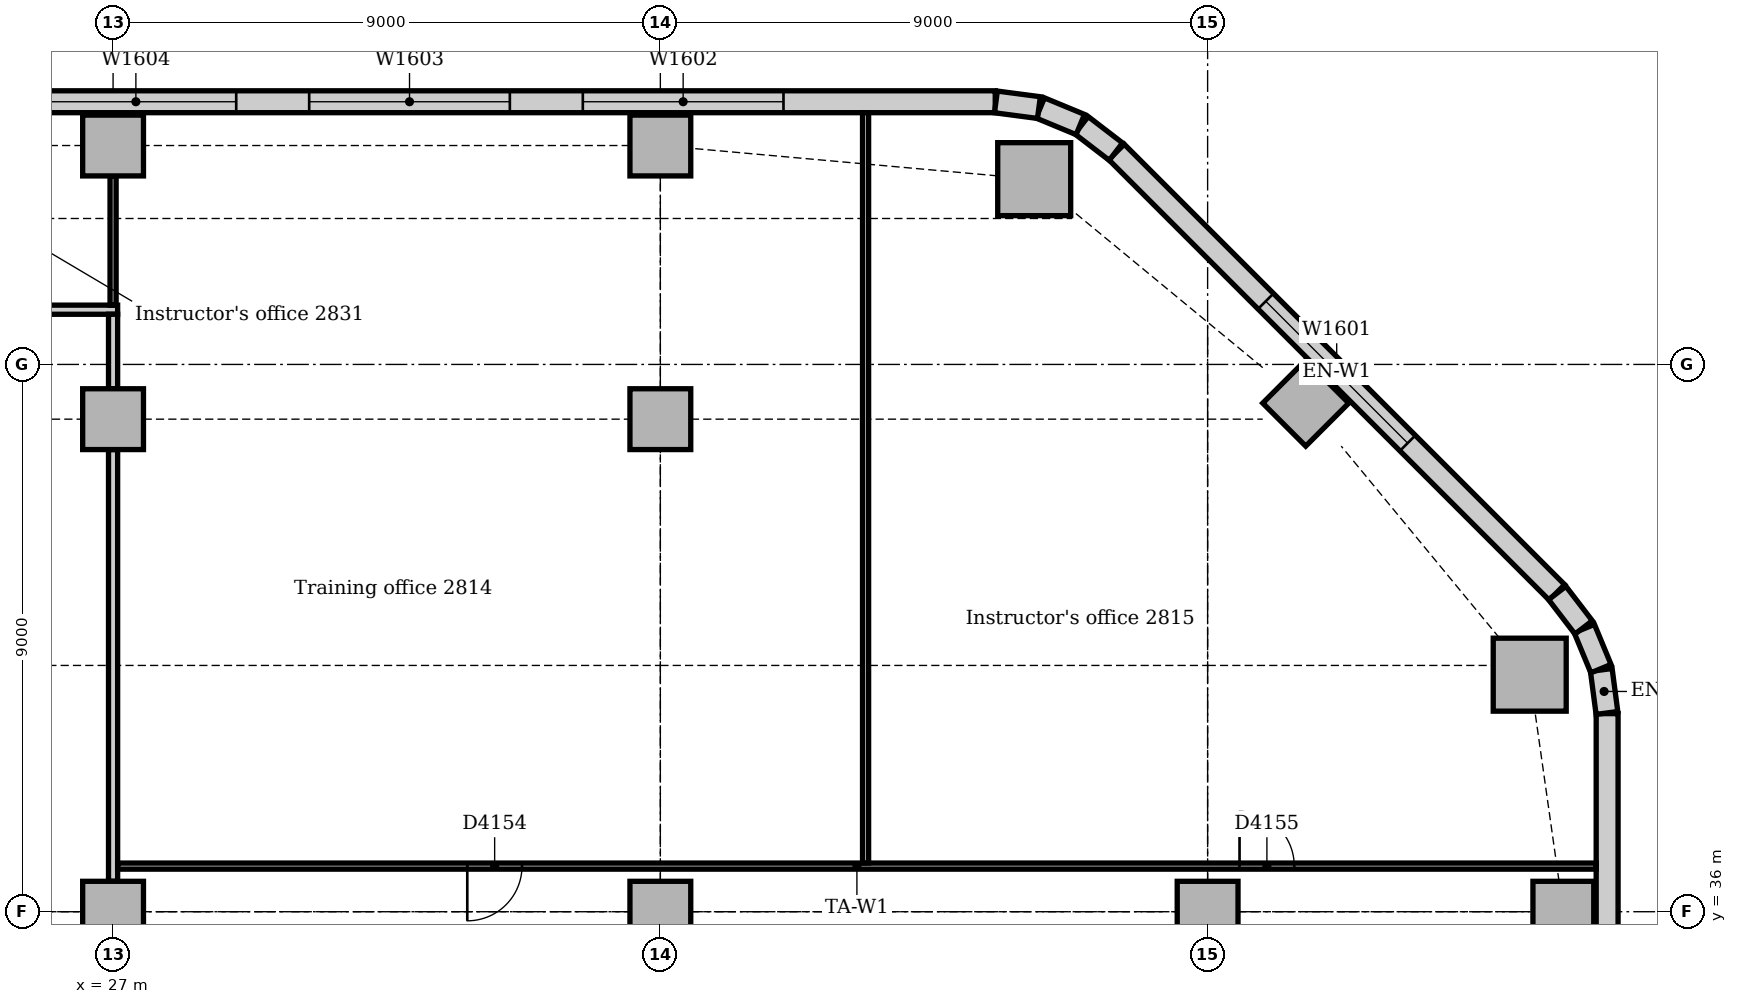
"""IFC4 building model, lengths in metres.
Left out: names, types, materials, properties, quantities, classifications, styles, units other than length and angle.
Written with IfcOpenShell. Run it as: python <this file> out.ifc"""

import sys

from ifc_helpers import new_model, si_unit, direction, frame, frame_2d, origin, origin_2d, place, context, subcontext, project, spatial, rectangle, extrude, element, fill, save


model = new_model("IFC4")
c1 = context("Model", 3, precision=1e-05, world=origin(), true_north=direction((0.0, 1.0)))
c2 = subcontext(c1, "Body", "Model", "MODEL_VIEW")
j1 = project(units=[si_unit("LENGTHUNIT", "METRE"), si_unit("PLANEANGLEUNIT", "RADIAN")], contexts=[c1])
p1 = place(None, origin())
s1 = spatial("IfcSite", under=j1, at=p1, CompositionType="ELEMENT")
p2 = place(p1, origin())
s2 = spatial("IfcBuilding", under=s1, at=p2, CompositionType="ELEMENT")
p3 = place(p2, frame((0.0, 0.0, 120.0)))
s3 = spatial("IfcBuildingStorey", under=s2, at=p3, CompositionType="ELEMENT", Elevation=120.0)
for number, where, z_axis, x_axis in (
    (1, (50.297, 39.898, 0.0), (0.0, 0.0, 1.0), (1.0, 0.0, 0.0)),
    (2, (42.148, 48.047, 0.0), (0.0, 0.0, 1.0), (1.0, 0.0, 0.0)),
):
    element("IfcColumn", number, at=place(p3, frame(where, z_axis=z_axis, x_axis=x_axis)), inside=s3, PredefinedType="COLUMN", context=c2, shape_type="SweptSolid", body=[
        extrude(rectangle(XDim=1.2, YDim=1.2, at=origin_2d()), origin(), (0.0, 0.0, 1.0), 3.85),
    ])
for number, where, z_axis, x_axis in (
    (3, (50.85, 36.0, 0.0), (0.0, 0.0, 1.0), (1.0, 0.0, 0.0)),
    (4, (46.614, 44.364, 0.0), (0.0, 0.0, 1.0), (0.707, 0.707, 0.0)),
    (5, (27.0, 48.6, 0.0), (0.0, 0.0, 1.0), (1.0, 0.0, 0.0)),
    (6, (36.0, 48.6, 0.0), (0.0, 0.0, 1.0), (1.0, 0.0, 0.0)),
    (7, (27.0, 36.0, 0.0), (0.0, 0.0, 1.0), (1.0, 0.0, 0.0)),
    (8, (27.0, 44.1, 0.0), (0.0, 0.0, 1.0), (1.0, 0.0, 0.0)),
    (9, (36.0, 36.0, 0.0), (0.0, 0.0, 1.0), (1.0, 0.0, 0.0)),
    (10, (36.0, 44.1, 0.0), (0.0, 0.0, 1.0), (1.0, 0.0, 0.0)),
    (11, (45.0, 36.0, 0.0), (0.0, 0.0, 1.0), (1.0, 0.0, 0.0)),
):
    element("IfcColumn", number, at=place(p3, frame(where, z_axis=z_axis, x_axis=x_axis)), inside=s3, PredefinedType="COLUMN", context=c2, shape_type="SweptSolid", body=[
        extrude(rectangle(XDim=1.0, YDim=1.0, at=origin_2d()), origin(), (0.0, 0.0, 1.0), 3.85),
    ])
p4 = place(p3, frame((51.57, 14.743, 0.0), z_axis=(0.0, 0.0, 1.0), x_axis=(0.0, 1.0, 0.0)))
e12 = element("IfcWall", 12, at=p4, inside=s3, PredefinedType="STANDARD", context=c2, shape_type="SweptSolid", body=[
    extrude(rectangle(XDim=24.515, YDim=0.36, at=frame_2d((12.257, 0.0))), origin(), (0.0, 0.0, 1.0), 3.85),
])
p5 = place(p4, frame((4.257, 0.0, 0.9)))
e13 = element("IfcOpeningElement", 13, at=p5, cuts=e12, PredefinedType="OPENING", context=c2, shape_type="SweptSolid", body=[
    extrude(rectangle(XDim=1.8, YDim=1.6, at=frame_2d((0.9, 0.8))), frame((0.0, 0.19, 0.0), z_axis=(0.0, -1.0, 0.0), x_axis=(1.0, 0.0, 0.0)), (0.0, 0.0, 1.0), 0.38),
])
p6 = place(p4, frame((8.057, 0.0, 0.9)))
e14 = element("IfcOpeningElement", 14, at=p6, cuts=e12, PredefinedType="OPENING", context=c2, shape_type="SweptSolid", body=[
    extrude(rectangle(XDim=3.3, YDim=1.6, at=frame_2d((1.65, 0.8))), frame((0.0, 0.19, 0.0), z_axis=(0.0, -1.0, 0.0), x_axis=(1.0, 0.0, 0.0)), (0.0, 0.0, 1.0), 0.38),
])
p7 = place(p4, frame((12.857, 0.0, 0.9)))
e15 = element("IfcOpeningElement", 15, at=p7, cuts=e12, PredefinedType="OPENING", context=c2, shape_type="SweptSolid", body=[
    extrude(rectangle(XDim=3.3, YDim=1.6, at=frame_2d((1.65, 0.8))), frame((0.0, 0.19, 0.0), z_axis=(0.0, -1.0, 0.0), x_axis=(1.0, 0.0, 0.0)), (0.0, 0.0, 1.0), 0.38),
])
p8 = place(p4, frame((17.357, 0.0, 0.9)))
e16 = element("IfcOpeningElement", 16, at=p8, cuts=e12, PredefinedType="OPENING", context=c2, shape_type="SweptSolid", body=[
    extrude(rectangle(XDim=3.3, YDim=1.6, at=frame_2d((1.65, 0.8))), frame((0.0, 0.19, 0.0), z_axis=(0.0, -1.0, 0.0), x_axis=(1.0, 0.0, 0.0)), (0.0, 0.0, 1.0), 0.38),
])
p9 = place(p3, frame((50.744, 41.251, 0.0), z_axis=(0.0, 0.0, 1.0), x_axis=(-0.707106781187, 0.707106781187, 0.0)))
e17 = element("IfcWall", 17, at=p9, inside=s3, PredefinedType="STANDARD", context=c2, shape_type="SweptSolid", body=[
    extrude(rectangle(XDim=10.243, YDim=0.36, at=frame_2d((5.121, 0.0))), origin(), (0.0, 0.0, 1.0), 3.85),
])
p10 = place(p9, frame((3.471, 0.0, 0.9)))
e18 = element("IfcOpeningElement", 18, at=p10, cuts=e17, PredefinedType="OPENING", context=c2, shape_type="SweptSolid", body=[
    extrude(rectangle(XDim=3.3, YDim=1.6, at=frame_2d((1.65, 0.8))), frame((0.0, 0.19, 0.0), z_axis=(0.0, -1.0, 0.0), x_axis=(1.0, 0.0, 0.0)), (0.0, 0.0, 1.0), 0.38),
])
p11 = place(p3, frame((41.507, 49.32, 0.0), z_axis=(0.0, 0.0, 1.0), x_axis=(-1.0, 0.0, 0.0)))
e19 = element("IfcWall", 19, at=p11, inside=s3, PredefinedType="STANDARD", context=c2, shape_type="SweptSolid", body=[
    extrude(rectangle(XDim=37.265, YDim=0.36, at=frame_2d((18.632, 0.0))), origin(), (0.0, 0.0, 1.0), 3.85),
])
p12 = place(p11, frame((3.482, 0.0, 0.9)))
e20 = element("IfcOpeningElement", 20, at=p12, cuts=e19, PredefinedType="OPENING", context=c2, shape_type="SweptSolid", body=[
    extrude(rectangle(XDim=3.3, YDim=1.6, at=frame_2d((1.65, 0.8))), frame((0.0, 0.19, 0.0), z_axis=(0.0, -1.0, 0.0), x_axis=(1.0, 0.0, 0.0)), (0.0, 0.0, 1.0), 0.38),
])
p13 = place(p11, frame((7.982, 0.0, 0.9)))
e21 = element("IfcOpeningElement", 21, at=p13, cuts=e19, PredefinedType="OPENING", context=c2, shape_type="SweptSolid", body=[
    extrude(rectangle(XDim=3.3, YDim=1.6, at=frame_2d((1.65, 0.8))), frame((0.0, 0.19, 0.0), z_axis=(0.0, -1.0, 0.0), x_axis=(1.0, 0.0, 0.0)), (0.0, 0.0, 1.0), 0.38),
])
p14 = place(p11, frame((12.482, 0.0, 0.9)))
e22 = element("IfcOpeningElement", 22, at=p14, cuts=e19, PredefinedType="OPENING", context=c2, shape_type="SweptSolid", body=[
    extrude(rectangle(XDim=3.3, YDim=1.6, at=frame_2d((1.65, 0.8))), frame((0.0, 0.19, 0.0), z_axis=(0.0, -1.0, 0.0), x_axis=(1.0, 0.0, 0.0)), (0.0, 0.0, 1.0), 0.38),
])
p15 = place(p11, frame((17.032, 0.0, 0.9)))
e23 = element("IfcOpeningElement", 23, at=p15, cuts=e19, PredefinedType="OPENING", context=c2, shape_type="SweptSolid", body=[
    extrude(rectangle(XDim=1.8, YDim=1.6, at=frame_2d((0.9, 0.8))), frame((0.0, 0.19, 0.0), z_axis=(0.0, -1.0, 0.0), x_axis=(1.0, 0.0, 0.0)), (0.0, 0.0, 1.0), 0.38),
])
p16 = place(p11, frame((21.482, 0.0, 0.9)))
e24 = element("IfcOpeningElement", 24, at=p16, cuts=e19, PredefinedType="OPENING", context=c2, shape_type="SweptSolid", body=[
    extrude(rectangle(XDim=3.3, YDim=1.6, at=frame_2d((1.65, 0.8))), frame((0.0, 0.19, 0.0), z_axis=(0.0, -1.0, 0.0), x_axis=(1.0, 0.0, 0.0)), (0.0, 0.0, 1.0), 0.38),
])
p17 = place(p11, frame((25.982, 0.0, 0.9)))
e25 = element("IfcOpeningElement", 25, at=p17, cuts=e19, PredefinedType="OPENING", context=c2, shape_type="SweptSolid", body=[
    extrude(rectangle(XDim=3.3, YDim=1.6, at=frame_2d((1.65, 0.8))), frame((0.0, 0.19, 0.0), z_axis=(0.0, -1.0, 0.0), x_axis=(1.0, 0.0, 0.0)), (0.0, 0.0, 1.0), 0.38),
])
p18 = place(p11, frame((30.482, 0.0, 0.9)))
e26 = element("IfcOpeningElement", 26, at=p18, cuts=e19, PredefinedType="OPENING", context=c2, shape_type="SweptSolid", body=[
    extrude(rectangle(XDim=3.3, YDim=1.6, at=frame_2d((1.65, 0.8))), frame((0.0, 0.19, 0.0), z_axis=(0.0, -1.0, 0.0), x_axis=(1.0, 0.0, 0.0)), (0.0, 0.0, 1.0), 0.38),
])
for number, where, z_axis, x_axis in (
    (27, (51.567, 39.269, 0.0), (0.0, 0.0, 1.0), (-0.131, 0.991, 0.0)),
    (28, (51.468, 39.997, 0.0), (0.0, 0.0, 1.0), (-0.383, 0.924, 0.0)),
):
    element("IfcWall", number, at=place(p3, frame(where, z_axis=z_axis, x_axis=x_axis)), inside=s3, PredefinedType="STANDARD", context=c2, shape_type="SweptSolid", body=[
        extrude(rectangle(XDim=0.713, YDim=0.36, at=frame_2d((0.356, 0.0))), origin(), (0.0, 0.0, 1.0), 3.85),
    ])
for number, where, z_axis, x_axis in (
    (29, (51.184, 40.675, 0.0), (0.0, 0.0, 1.0), (-0.609, 0.793, 0.0)),
    (30, (43.491, 48.5, 0.0), (0.0, 0.0, 1.0), (-0.793, 0.609, 0.0)),
):
    element("IfcWall", number, at=place(p3, frame(where, z_axis=z_axis, x_axis=x_axis)), inside=s3, PredefinedType="STANDARD", context=c2, shape_type="SweptSolid", body=[
        extrude(rectangle(XDim=0.713, YDim=0.36, at=frame_2d((0.357, 0.0))), origin(), (0.0, 0.0, 1.0), 3.85),
    ])
for number, where, z_axis, x_axis in (
    (31, (42.906, 48.945, 0.0), (0.0, 0.0, 1.0), (-0.924, 0.383, 0.0)),
    (32, (42.226, 49.224, 0.0), (0.0, 0.0, 1.0), (-0.991, 0.131, 0.0)),
):
    element("IfcWall", number, at=place(p3, frame(where, z_axis=z_axis, x_axis=x_axis)), inside=s3, PredefinedType="STANDARD", context=c2, shape_type="SweptSolid", body=[
        extrude(rectangle(XDim=0.713, YDim=0.36, at=frame_2d((0.356, 0.0))), origin(), (0.0, 0.0, 1.0), 3.85),
    ])
p19 = place(p3, frame((2.053, 45.9, 0.0), z_axis=(0.0, 0.0, 1.0), x_axis=(1.0, 0.0, 0.0)))
e33 = element("IfcWall", 33, at=p19, inside=s3, PredefinedType="PARTITIONING", context=c2, shape_type="SweptSolid", body=[
    extrude(rectangle(XDim=25.022, YDim=0.15, at=frame_2d((12.511, 0.0))), origin(), (0.0, 0.0, 1.0), 3.85),
])
p20 = place(p19, frame((3.1, 0.0, 0.0)))
e34 = element("IfcOpeningElement", 34, at=p20, cuts=e33, PredefinedType="OPENING", context=c2, shape_type="SweptSolid", body=[
    extrude(rectangle(XDim=0.9, YDim=2.1, at=frame_2d((0.45, 1.05))), frame((0.0, 0.085, 0.0), z_axis=(0.0, -1.0, 0.0), x_axis=(1.0, 0.0, 0.0)), (0.0, 0.0, 1.0), 0.17),
])
p21 = place(p19, frame((13.247, 0.0, 0.0)))
e35 = element("IfcOpeningElement", 35, at=p21, cuts=e33, PredefinedType="OPENING", context=c2, shape_type="SweptSolid", body=[
    extrude(rectangle(XDim=0.9, YDim=2.1, at=frame_2d((0.45, 1.05))), frame((0.0, 0.085, 0.0), z_axis=(0.0, -1.0, 0.0), x_axis=(1.0, 0.0, 0.0)), (0.0, 0.0, 1.0), 0.17),
])
p22 = place(p19, frame((22.197, 0.0, 0.0)))
e36 = element("IfcOpeningElement", 36, at=p22, cuts=e33, PredefinedType="OPENING", context=c2, shape_type="SweptSolid", body=[
    extrude(rectangle(XDim=0.9, YDim=2.1, at=frame_2d((0.45, 1.05))), frame((0.0, 0.085, 0.0), z_axis=(0.0, -1.0, 0.0), x_axis=(1.0, 0.0, 0.0)), (0.0, 0.0, 1.0), 0.17),
])
p23 = place(p3, frame((27.0, 36.5, 0.0), z_axis=(0.0, 0.0, 1.0), x_axis=(0.0, 1.0, 0.0)))
e37 = element("IfcWall", 37, at=p23, inside=s3, PredefinedType="PARTITIONING", context=c2, shape_type="SweptSolid", body=[
    extrude(rectangle(XDim=7.1, YDim=0.15, at=frame_2d((3.55, 0.0))), origin(), (0.0, 0.0, 1.0), 3.256),
])
p24 = place(p3, frame((27.0, 44.6, 0.0), z_axis=(0.0, 0.0, 1.0), x_axis=(0.0, 1.0, 0.0)))
e38 = element("IfcWall", 38, at=p24, inside=s3, PredefinedType="PARTITIONING", context=c2, shape_type="SweptSolid", body=[
    extrude(rectangle(XDim=1.225, YDim=0.15, at=frame_2d((0.613, 0.0))), origin(), (0.0, 0.0, 1.0), 3.652),
])
p25 = place(p3, frame((27.075, 36.75, 0.0), z_axis=(0.0, 0.0, 1.0), x_axis=(1.0, 0.0, 0.0)))
e39 = element("IfcWall", 39, at=p25, inside=s3, PredefinedType="PARTITIONING", context=c2, shape_type="SweptSolid", body=[
    extrude(rectangle(XDim=24.315, YDim=0.1, at=frame_2d((12.158, 0.0))), origin(), (0.0, 0.0, 1.0), 3.85),
])
p26 = place(p25, frame((5.75, 0.0, 0.0)))
e40 = element("IfcOpeningElement", 40, at=p26, cuts=e39, PredefinedType="OPENING", context=c2, shape_type="SweptSolid", body=[
    extrude(rectangle(XDim=0.9, YDim=2.1, at=frame_2d((0.45, 1.05))), frame((0.0, 0.06, 0.0), z_axis=(0.0, -1.0, 0.0), x_axis=(1.0, 0.0, 0.0)), (0.0, 0.0, 1.0), 0.12),
])
p27 = place(p25, frame((18.45, 0.0, 0.0)))
e41 = element("IfcOpeningElement", 41, at=p27, cuts=e39, PredefinedType="OPENING", context=c2, shape_type="SweptSolid", body=[
    extrude(rectangle(XDim=0.9, YDim=2.1, at=frame_2d((0.45, 1.05))), frame((0.0, 0.06, 0.0), z_axis=(0.0, -1.0, 0.0), x_axis=(1.0, 0.0, 0.0)), (0.0, 0.0, 1.0), 0.12),
])
p28 = place(p3, frame((39.375, 36.8, 0.0), z_axis=(0.0, 0.0, 1.0), x_axis=(0.0, 1.0, 0.0)))
e42 = element("IfcWall", 42, at=p28, inside=s3, PredefinedType="PARTITIONING", context=c2, shape_type="SweptSolid", body=[
    extrude(rectangle(XDim=12.34, YDim=0.1, at=frame_2d((6.17, 0.0))), origin(), (0.0, 0.0, 1.0), 3.85),
])
p29 = place(p3, frame((27.0, 45.975, 0.0), z_axis=(0.0, 0.0, 1.0), x_axis=(0.0, 1.0, 0.0)))
e43 = element("IfcWall", 43, at=p29, inside=s3, PredefinedType="PARTITIONING", context=c2, shape_type="SweptSolid", body=[
    extrude(rectangle(XDim=2.125, YDim=0.1, at=frame_2d((1.062, 0.0))), origin(), (0.0, 0.0, 1.0), 3.652),
])
p30 = place(p10, origin())
e44 = element("IfcWindow", 44, at=p30, inside=s3, PartitioningType="SINGLE_PANEL", PredefinedType="WINDOW", context=c2, shape_type="SweptSolid", body=[
    extrude(rectangle(XDim=3.3, YDim=1.6, at=frame_2d((1.65, 0.8))), frame((0.0, 0.13, 0.0), z_axis=(0.0, -1.0, 0.0), x_axis=(1.0, 0.0, 0.0)), (0.0, 0.0, 1.0), 0.06),
])
fill(e18, e44)
p31 = place(p12, origin())
e45 = element("IfcWindow", 45, at=p31, inside=s3, PartitioningType="SINGLE_PANEL", PredefinedType="WINDOW", context=c2, shape_type="SweptSolid", body=[
    extrude(rectangle(XDim=3.3, YDim=1.6, at=frame_2d((1.65, 0.8))), frame((0.0, 0.13, 0.0), z_axis=(0.0, -1.0, 0.0), x_axis=(1.0, 0.0, 0.0)), (0.0, 0.0, 1.0), 0.06),
])
fill(e20, e45)
p32 = place(p13, origin())
e46 = element("IfcWindow", 46, at=p32, inside=s3, PartitioningType="SINGLE_PANEL", PredefinedType="WINDOW", context=c2, shape_type="SweptSolid", body=[
    extrude(rectangle(XDim=3.3, YDim=1.6, at=frame_2d((1.65, 0.8))), frame((0.0, 0.13, 0.0), z_axis=(0.0, -1.0, 0.0), x_axis=(1.0, 0.0, 0.0)), (0.0, 0.0, 1.0), 0.06),
])
fill(e21, e46)
p33 = place(p14, origin())
e47 = element("IfcWindow", 47, at=p33, inside=s3, PartitioningType="SINGLE_PANEL", PredefinedType="WINDOW", context=c2, shape_type="SweptSolid", body=[
    extrude(rectangle(XDim=3.3, YDim=1.6, at=frame_2d((1.65, 0.8))), frame((0.0, 0.13, 0.0), z_axis=(0.0, -1.0, 0.0), x_axis=(1.0, 0.0, 0.0)), (0.0, 0.0, 1.0), 0.06),
])
fill(e22, e47)
p34 = place(p26, frame((0.9, 0.0, 0.0), z_axis=(0.0, 0.0, 1.0), x_axis=(-1.0, 0.0, 0.0)))
e48 = element("IfcDoor", 48, at=p34, inside=s3, OperationType="SINGLE_SWING_RIGHT", PredefinedType="DOOR", context=c2, shape_type="SweptSolid", body=[
    extrude(rectangle(XDim=0.9, YDim=2.1, at=frame_2d((0.45, 1.05))), frame((0.0, 0.025, 0.0), z_axis=(0.0, -1.0, 0.0), x_axis=(1.0, 0.0, 0.0)), (0.0, 0.0, 1.0), 0.05),
])
fill(e40, e48)
p35 = place(p27, origin())
e49 = element("IfcDoor", 49, at=p35, inside=s3, OperationType="SINGLE_SWING_LEFT", PredefinedType="DOOR", context=c2, shape_type="SweptSolid", body=[
    extrude(rectangle(XDim=0.9, YDim=2.1, at=frame_2d((0.45, 1.05))), frame((0.0, 0.025, 0.0), z_axis=(0.0, -1.0, 0.0), x_axis=(1.0, 0.0, 0.0)), (0.0, 0.0, 1.0), 0.05),
])
fill(e41, e49)
save(model, sys.argv[1])
